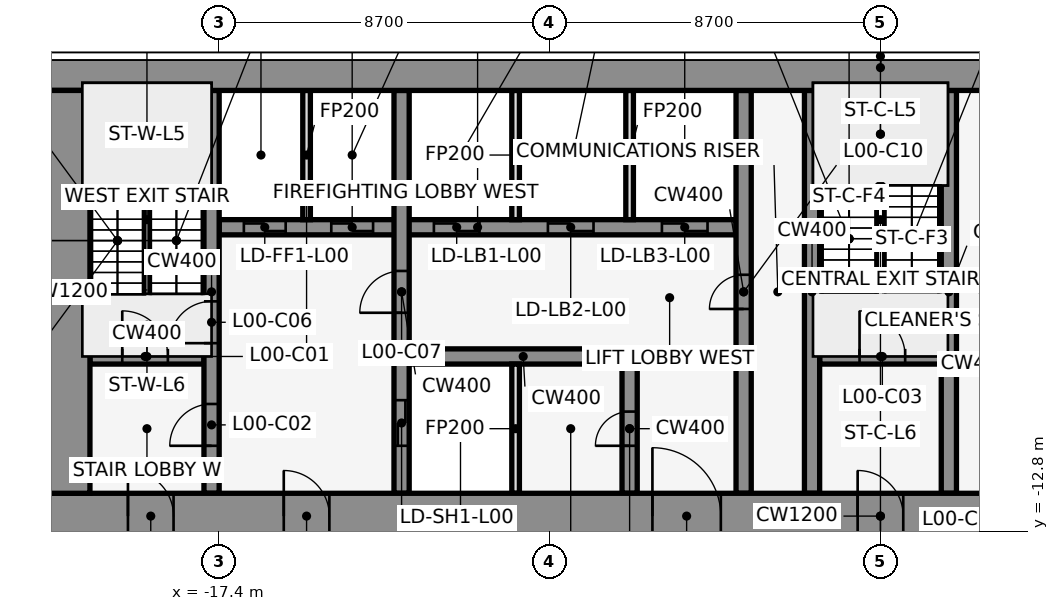
"""IFC4 building model, lengths in metres.
Left out: names, types, materials, properties, quantities, classifications, styles, units other than length and angle.
Written with IfcOpenShell. Run it as: python <this file> out.ifc"""

import sys

from ifc_helpers import new_model, si_unit, direction, frame, frame_2d, origin, place, context, subcontext, project, spatial, rectangle, extrude, element, fill, save


model = new_model("IFC4")
c1 = context("Model", 3, precision=1e-05, world=origin(), true_north=direction((0.0, 1.0)))
c2 = subcontext(c1, "Body", "Model", "MODEL_VIEW")
j1 = project(units=[si_unit("LENGTHUNIT", "METRE"), si_unit("PLANEANGLEUNIT", "RADIAN")], contexts=[c1])
p1 = place(None, origin())
s1 = spatial("IfcSite", under=j1, at=p1, CompositionType="ELEMENT")
p2 = place(p1, origin())
s2 = spatial("IfcBuilding", under=s1, at=p2, CompositionType="ELEMENT")
p3 = place(p2, origin())
s3 = spatial("IfcBuildingStorey", under=s2, at=p3, CompositionType="ELEMENT", Elevation=0.0)
p4 = place(p3, frame((-20.8, -8.2, 0.0), z_axis=(0.0, 0.0, 1.0), x_axis=(1.0, 0.0, 0.0)))
e1 = element("IfcWall", 1, at=p4, inside=s3, PredefinedType="SHEAR", context=c2, shape_type="SweptSolid", body=[
    extrude(rectangle(XDim=3.0, YDim=0.4, at=frame_2d((1.5, 0.0))), origin(), (0.0, 0.0, 1.0), 8.0),
])
p5 = place(p4, frame((0.85, 0.0, 0.0)))
e2 = element("IfcOpeningElement", 2, at=p5, cuts=e1, PredefinedType="OPENING", context=c2, shape_type="SweptSolid", body=[
    extrude(rectangle(XDim=1.2, YDim=2.1, at=frame_2d((0.6, 1.05))), frame((0.0, 0.212, 0.0), z_axis=(0.0, -1.0, 0.0), x_axis=(1.0, 0.0, 0.0)), (0.0, 0.0, 1.0), 0.424),
])
p6 = place(p3, frame((-12.4, -8.2, 0.0), z_axis=(0.0, 0.0, 1.0), x_axis=(1.0, 0.0, 0.0)))
e3 = element("IfcWall", 3, at=p6, inside=s3, PredefinedType="SHEAR", context=c2, shape_type="SweptSolid", body=[
    extrude(rectangle(XDim=6.0, YDim=0.4, at=frame_2d((3.0, 0.0))), origin(), (0.0, 0.0, 1.0), 8.0),
])
p7 = place(p3, frame((-1.6, -8.2, 0.0), z_axis=(0.0, 0.0, 1.0), x_axis=(1.0, 0.0, 0.0)))
e4 = element("IfcWall", 4, at=p7, inside=s3, PredefinedType="SHEAR", context=c2, shape_type="SweptSolid", body=[
    extrude(rectangle(XDim=3.2, YDim=0.4, at=frame_2d((1.6, 0.0))), origin(), (0.0, 0.0, 1.0), 8.0),
])
p8 = place(p7, frame((1.05, 0.0, 0.0)))
e5 = element("IfcOpeningElement", 5, at=p8, cuts=e4, PredefinedType="OPENING", context=c2, shape_type="SweptSolid", body=[
    extrude(rectangle(XDim=1.2, YDim=2.1, at=frame_2d((0.6, 1.05))), frame((0.0, 0.212, 0.0), z_axis=(0.0, -1.0, 0.0), x_axis=(1.0, 0.0, 0.0)), (0.0, 0.0, 1.0), 0.424),
])
p9 = place(p3, frame((-17.4, -4.8, 0.0), z_axis=(0.0, 0.0, 1.0), x_axis=(1.0, 0.0, 0.0)))
e6 = element("IfcWall", 6, at=p9, inside=s3, PredefinedType="SHEAR", context=c2, shape_type="SweptSolid", body=[
    extrude(rectangle(XDim=13.6, YDim=0.4, at=frame_2d((6.8, 0.0))), origin(), (0.0, 0.0, 1.0), 8.0),
])
p10 = place(p9, frame((0.65, 0.0, 0.0)))
e7 = element("IfcOpeningElement", 7, at=p10, cuts=e6, PredefinedType="OPENING", context=c2, shape_type="SweptSolid", body=[
    extrude(rectangle(XDim=1.1, YDim=2.1, at=frame_2d((0.55, 1.05))), frame((0.0, 0.212, 0.0), z_axis=(0.0, -1.0, 0.0), x_axis=(1.0, 0.0, 0.0)), (0.0, 0.0, 1.0), 0.424),
])
p11 = place(p9, frame((2.95, 0.0, 0.0)))
e8 = element("IfcOpeningElement", 8, at=p11, cuts=e6, PredefinedType="OPENING", context=c2, shape_type="SweptSolid", body=[
    extrude(rectangle(XDim=1.1, YDim=2.1, at=frame_2d((0.55, 1.05))), frame((0.0, 0.212, 0.0), z_axis=(0.0, -1.0, 0.0), x_axis=(1.0, 0.0, 0.0)), (0.0, 0.0, 1.0), 0.424),
])
p12 = place(p9, frame((5.65, 0.0, 0.0)))
e9 = element("IfcOpeningElement", 9, at=p12, cuts=e6, PredefinedType="OPENING", context=c2, shape_type="SweptSolid", body=[
    extrude(rectangle(XDim=1.2, YDim=2.1, at=frame_2d((0.6, 1.05))), frame((0.0, 0.212, 0.0), z_axis=(0.0, -1.0, 0.0), x_axis=(1.0, 0.0, 0.0)), (0.0, 0.0, 1.0), 0.424),
])
p13 = place(p9, frame((8.65, 0.0, 0.0)))
e10 = element("IfcOpeningElement", 10, at=p13, cuts=e6, PredefinedType="OPENING", context=c2, shape_type="SweptSolid", body=[
    extrude(rectangle(XDim=1.2, YDim=2.1, at=frame_2d((0.6, 1.05))), frame((0.0, 0.212, 0.0), z_axis=(0.0, -1.0, 0.0), x_axis=(1.0, 0.0, 0.0)), (0.0, 0.0, 1.0), 0.424),
])
p14 = place(p9, frame((11.65, 0.0, 0.0)))
e11 = element("IfcOpeningElement", 11, at=p14, cuts=e6, PredefinedType="OPENING", context=c2, shape_type="SweptSolid", body=[
    extrude(rectangle(XDim=1.2, YDim=2.1, at=frame_2d((0.6, 1.05))), frame((0.0, 0.212, 0.0), z_axis=(0.0, -1.0, 0.0), x_axis=(1.0, 0.0, 0.0)), (0.0, 0.0, 1.0), 0.424),
])
p15 = place(p3, frame((-17.6, -11.8, 0.0), z_axis=(0.0, 0.0, 1.0), x_axis=(0.0, 1.0, 0.0)))
e12 = element("IfcWall", 12, at=p15, inside=s3, PredefinedType="SHEAR", context=c2, shape_type="SweptSolid", body=[
    extrude(rectangle(XDim=10.6, YDim=0.4, at=frame_2d((5.3, 0.0))), origin(), (0.0, 0.0, 1.0), 8.0),
])
p16 = place(p15, frame((1.25, 0.0, 0.0)))
e13 = element("IfcOpeningElement", 13, at=p16, cuts=e12, PredefinedType="OPENING", context=c2, shape_type="SweptSolid", body=[
    extrude(rectangle(XDim=1.1, YDim=2.1, at=frame_2d((0.55, 1.05))), frame((0.0, 0.212, 0.0), z_axis=(0.0, -1.0, 0.0), x_axis=(1.0, 0.0, 0.0)), (0.0, 0.0, 1.0), 0.424),
])
p17 = place(p15, frame((3.95, 0.0, 0.0)))
e14 = element("IfcOpeningElement", 14, at=p17, cuts=e12, PredefinedType="OPENING", context=c2, shape_type="SweptSolid", body=[
    extrude(rectangle(XDim=1.1, YDim=2.1, at=frame_2d((0.55, 1.05))), frame((0.0, 0.212, 0.0), z_axis=(0.0, -1.0, 0.0), x_axis=(1.0, 0.0, 0.0)), (0.0, 0.0, 1.0), 0.424),
])
p18 = place(p3, frame((-15.1, -4.6, 0.0), z_axis=(0.0, 0.0, 1.0), x_axis=(0.0, 1.0, 0.0)))
e15 = element("IfcWall", 15, at=p18, inside=s3, PredefinedType="PARTITIONING", context=c2, shape_type="SweptSolid", body=[
    extrude(rectangle(XDim=3.4, YDim=0.2, at=frame_2d((1.7, 0.0))), origin(), (0.0, 0.0, 1.0), 7.7),
])
p19 = place(p3, frame((-12.6, -11.8, 0.0), z_axis=(0.0, 0.0, 1.0), x_axis=(0.0, 1.0, 0.0)))
e16 = element("IfcWall", 16, at=p19, inside=s3, PredefinedType="SHEAR", context=c2, shape_type="SweptSolid", body=[
    extrude(rectangle(XDim=10.6, YDim=0.4, at=frame_2d((5.3, 0.0))), origin(), (0.0, 0.0, 1.0), 8.0),
])
p20 = place(p19, frame((1.25, 0.0, 0.0)))
e17 = element("IfcOpeningElement", 17, at=p20, cuts=e16, PredefinedType="OPENING", context=c2, shape_type="SweptSolid", body=[
    extrude(rectangle(XDim=1.2, YDim=2.1, at=frame_2d((0.6, 1.05))), frame((0.0, 0.212, 0.0), z_axis=(0.0, -1.0, 0.0), x_axis=(1.0, 0.0, 0.0)), (0.0, 0.0, 1.0), 0.424),
])
p21 = place(p19, frame((4.75, 0.0, 0.0)))
e18 = element("IfcOpeningElement", 18, at=p21, cuts=e16, PredefinedType="OPENING", context=c2, shape_type="SweptSolid", body=[
    extrude(rectangle(XDim=1.1, YDim=2.1, at=frame_2d((0.55, 1.05))), frame((0.0, 0.212, 0.0), z_axis=(0.0, -1.0, 0.0), x_axis=(1.0, 0.0, 0.0)), (0.0, 0.0, 1.0), 0.424),
])
for number, where, z_axis, x_axis in (
    (19, (-9.6, -11.8, 0.0), (0.0, 0.0, 1.0), (0.0, 1.0, 0.0)),
    (20, (-9.6, -4.6, 0.0), (0.0, 0.0, 1.0), (0.0, 1.0, 0.0)),
):
    element("IfcWall", number, at=place(p3, frame(where, z_axis=z_axis, x_axis=x_axis)), inside=s3, PredefinedType="PARTITIONING", context=c2, shape_type="SweptSolid", body=[
        extrude(rectangle(XDim=3.4, YDim=0.2, at=frame_2d((1.7, 0.0))), origin(), (0.0, 0.0, 1.0), 7.7),
    ])
p22 = place(p3, frame((-6.6, -11.8, 0.0), z_axis=(0.0, 0.0, 1.0), x_axis=(0.0, 1.0, 0.0)))
e21 = element("IfcWall", 21, at=p22, inside=s3, PredefinedType="SHEAR", context=c2, shape_type="SweptSolid", body=[
    extrude(rectangle(XDim=3.4, YDim=0.4, at=frame_2d((1.7, 0.0))), origin(), (0.0, 0.0, 1.0), 8.0),
])
p23 = place(p22, frame((1.25, 0.0, 0.0)))
e22 = element("IfcOpeningElement", 22, at=p23, cuts=e21, PredefinedType="OPENING", context=c2, shape_type="SweptSolid", body=[
    extrude(rectangle(XDim=0.9, YDim=2.1, at=frame_2d((0.45, 1.05))), frame((0.0, 0.212, 0.0), z_axis=(0.0, -1.0, 0.0), x_axis=(1.0, 0.0, 0.0)), (0.0, 0.0, 1.0), 0.424),
])
p24 = place(p3, frame((-6.6, -4.6, 0.0), z_axis=(0.0, 0.0, 1.0), x_axis=(0.0, 1.0, 0.0)))
e23 = element("IfcWall", 23, at=p24, inside=s3, PredefinedType="PARTITIONING", context=c2, shape_type="SweptSolid", body=[
    extrude(rectangle(XDim=3.4, YDim=0.2, at=frame_2d((1.7, 0.0))), origin(), (0.0, 0.0, 1.0), 7.7),
])
p25 = place(p3, frame((-3.6, -11.8, 0.0), z_axis=(0.0, 0.0, 1.0), x_axis=(0.0, 1.0, 0.0)))
e24 = element("IfcWall", 24, at=p25, inside=s3, PredefinedType="SHEAR", context=c2, shape_type="SweptSolid", body=[
    extrude(rectangle(XDim=10.6, YDim=0.4, at=frame_2d((5.3, 0.0))), origin(), (0.0, 0.0, 1.0), 8.0),
])
p26 = place(p25, frame((4.85, 0.0, 0.0)))
e25 = element("IfcOpeningElement", 25, at=p26, cuts=e24, PredefinedType="OPENING", context=c2, shape_type="SweptSolid", body=[
    extrude(rectangle(XDim=0.9, YDim=2.1, at=frame_2d((0.45, 1.05))), frame((0.0, 0.212, 0.0), z_axis=(0.0, -1.0, 0.0), x_axis=(1.0, 0.0, 0.0)), (0.0, 0.0, 1.0), 0.424),
])
for number, where, z_axis, x_axis in (
    (26, (-1.8, -11.8, 0.0), (0.0, 0.0, 1.0), (0.0, 1.0, 0.0)),
    (27, (1.8, -11.8, 0.0), (0.0, 0.0, 1.0), (0.0, 1.0, 0.0)),
):
    element("IfcWall", number, at=place(p3, frame(where, z_axis=z_axis, x_axis=x_axis)), inside=s3, PredefinedType="SHEAR", context=c2, shape_type="SweptSolid", body=[
        extrude(rectangle(XDim=10.6, YDim=0.4, at=frame_2d((5.3, 0.0))), origin(), (0.0, 0.0, 1.0), 8.0),
    ])
p27 = place(p3, frame((-22.0, -0.6, 0.0), z_axis=(0.0, 0.0, 1.0), x_axis=(1.0, 0.0, 0.0)))
e28 = element("IfcWall", 28, at=p27, inside=s3, PredefinedType="SHEAR", context=c2, shape_type="SweptSolid", body=[
    extrude(rectangle(XDim=44.0, YDim=1.2, at=frame_2d((22.0, 0.0))), origin(), (0.0, 0.0, 1.0), 8.0),
])
p28 = place(p3, frame((-22.0, -12.4, 0.0), z_axis=(0.0, 0.0, 1.0), x_axis=(1.0, 0.0, 0.0)))
e29 = element("IfcWall", 29, at=p28, inside=s3, PredefinedType="SHEAR", context=c2, shape_type="SweptSolid", body=[
    extrude(rectangle(XDim=44.0, YDim=1.2, at=frame_2d((22.0, 0.0))), origin(), (0.0, 0.0, 1.0), 8.0),
])
p29 = place(p28, frame((2.2, 0.0, 0.0)))
e30 = element("IfcOpeningElement", 30, at=p29, cuts=e29, PredefinedType="OPENING", context=c2, shape_type="SweptSolid", body=[
    extrude(rectangle(XDim=1.2, YDim=2.1, at=frame_2d((0.6, 1.05))), frame((0.0, 0.612, 0.0), z_axis=(0.0, -1.0, 0.0), x_axis=(1.0, 0.0, 0.0)), (0.0, 0.0, 1.0), 1.224),
])
p30 = place(p28, frame((21.4, 0.0, 0.0)))
e31 = element("IfcOpeningElement", 31, at=p30, cuts=e29, PredefinedType="OPENING", context=c2, shape_type="SweptSolid", body=[
    extrude(rectangle(XDim=1.2, YDim=2.1, at=frame_2d((0.6, 1.05))), frame((0.0, 0.612, 0.0), z_axis=(0.0, -1.0, 0.0), x_axis=(1.0, 0.0, 0.0)), (0.0, 0.0, 1.0), 1.224),
])
p31 = place(p28, frame((40.6, 0.0, 0.0)))
e32 = element("IfcOpeningElement", 32, at=p31, cuts=e29, PredefinedType="OPENING", context=c2, shape_type="SweptSolid", body=[
    extrude(rectangle(XDim=1.2, YDim=2.1, at=frame_2d((0.6, 1.05))), frame((0.0, 0.612, 0.0), z_axis=(0.0, -1.0, 0.0), x_axis=(1.0, 0.0, 0.0)), (0.0, 0.0, 1.0), 1.224),
])
p32 = place(p28, frame((16.0, 0.0, 0.0)))
e33 = element("IfcOpeningElement", 33, at=p32, cuts=e29, PredefinedType="OPENING", context=c2, shape_type="SweptSolid", body=[
    extrude(rectangle(XDim=1.8, YDim=2.1, at=frame_2d((0.9, 1.05))), frame((0.0, 0.612, 0.0), z_axis=(0.0, -1.0, 0.0), x_axis=(1.0, 0.0, 0.0)), (0.0, 0.0, 1.0), 1.224),
])
p33 = place(p28, frame((6.3, 0.0, 0.0)))
e34 = element("IfcOpeningElement", 34, at=p33, cuts=e29, PredefinedType="OPENING", context=c2, shape_type="SweptSolid", body=[
    extrude(rectangle(XDim=1.2, YDim=2.1, at=frame_2d((0.6, 1.05))), frame((0.0, 0.612, 0.0), z_axis=(0.0, -1.0, 0.0), x_axis=(1.0, 0.0, 0.0)), (0.0, 0.0, 1.0), 1.224),
])
p34 = place(p28, frame((26.2, 0.0, 0.0)))
e35 = element("IfcOpeningElement", 35, at=p34, cuts=e29, PredefinedType="OPENING", context=c2, shape_type="SweptSolid", body=[
    extrude(rectangle(XDim=1.8, YDim=2.1, at=frame_2d((0.9, 1.05))), frame((0.0, 0.612, 0.0), z_axis=(0.0, -1.0, 0.0), x_axis=(1.0, 0.0, 0.0)), (0.0, 0.0, 1.0), 1.224),
])
p35 = place(p28, frame((36.5, 0.0, 0.0)))
e36 = element("IfcOpeningElement", 36, at=p35, cuts=e29, PredefinedType="OPENING", context=c2, shape_type="SweptSolid", body=[
    extrude(rectangle(XDim=1.2, YDim=2.1, at=frame_2d((0.6, 1.05))), frame((0.0, 0.612, 0.0), z_axis=(0.0, -1.0, 0.0), x_axis=(1.0, 0.0, 0.0)), (0.0, 0.0, 1.0), 1.224),
])
p36 = place(p3, frame((-21.4, -11.8, 0.0), z_axis=(0.0, 0.0, 1.0), x_axis=(0.0, 1.0, 0.0)))
e37 = element("IfcWall", 37, at=p36, inside=s3, PredefinedType="SHEAR", context=c2, shape_type="SweptSolid", body=[
    extrude(rectangle(XDim=10.6, YDim=1.2, at=frame_2d((5.3, 0.0))), origin(), (0.0, 0.0, 1.0), 8.0),
])
p37 = place(p5, origin())
e38 = element("IfcDoor", 38, at=p37, inside=s3, OperationType="SINGLE_SWING_LEFT", PredefinedType="DOOR", context=c2, shape_type="SweptSolid", body=[
    extrude(rectangle(XDim=1.2, YDim=2.1, at=frame_2d((0.6, 1.05))), frame((0.0, 0.025, 0.0), z_axis=(0.0, -1.0, 0.0), x_axis=(1.0, 0.0, 0.0)), (0.0, 0.0, 1.0), 0.05),
])
fill(e2, e38)
p38 = place(p16, frame((1.1, 0.0, 0.0), z_axis=(0.0, 0.0, 1.0), x_axis=(-1.0, 0.0, 0.0)))
e39 = element("IfcDoor", 39, at=p38, inside=s3, OperationType="SINGLE_SWING_LEFT", PredefinedType="DOOR", context=c2, shape_type="SweptSolid", body=[
    extrude(rectangle(XDim=1.1, YDim=2.1, at=frame_2d((0.55, 1.05))), frame((0.0, 0.025, 0.0), z_axis=(0.0, -1.0, 0.0), x_axis=(1.0, 0.0, 0.0)), (0.0, 0.0, 1.0), 0.05),
])
fill(e13, e39)
p39 = place(p8, origin())
e40 = element("IfcDoor", 40, at=p39, inside=s3, OperationType="SINGLE_SWING_LEFT", PredefinedType="DOOR", context=c2, shape_type="SweptSolid", body=[
    extrude(rectangle(XDim=1.2, YDim=2.1, at=frame_2d((0.6, 1.05))), frame((0.0, 0.025, 0.0), z_axis=(0.0, -1.0, 0.0), x_axis=(1.0, 0.0, 0.0)), (0.0, 0.0, 1.0), 0.05),
])
fill(e5, e40)
p40 = place(p10, origin())
e41 = element("IfcDoor", 41, at=p40, inside=s3, OperationType="DOUBLE_DOOR_SLIDING", PredefinedType="DOOR", context=c2, shape_type="SweptSolid", body=[
    extrude(rectangle(XDim=1.1, YDim=2.1, at=frame_2d((0.55, 1.05))), frame((0.0, 0.025, 0.0), z_axis=(0.0, -1.0, 0.0), x_axis=(1.0, 0.0, 0.0)), (0.0, 0.0, 1.0), 0.05),
])
fill(e7, e41)
p41 = place(p11, origin())
e42 = element("IfcDoor", 42, at=p41, inside=s3, OperationType="DOUBLE_DOOR_SLIDING", PredefinedType="DOOR", context=c2, shape_type="SweptSolid", body=[
    extrude(rectangle(XDim=1.1, YDim=2.1, at=frame_2d((0.55, 1.05))), frame((0.0, 0.025, 0.0), z_axis=(0.0, -1.0, 0.0), x_axis=(1.0, 0.0, 0.0)), (0.0, 0.0, 1.0), 0.05),
])
fill(e8, e42)
p42 = place(p12, origin())
e43 = element("IfcDoor", 43, at=p42, inside=s3, OperationType="DOUBLE_DOOR_SLIDING", PredefinedType="DOOR", context=c2, shape_type="SweptSolid", body=[
    extrude(rectangle(XDim=1.2, YDim=2.1, at=frame_2d((0.6, 1.05))), frame((0.0, 0.025, 0.0), z_axis=(0.0, -1.0, 0.0), x_axis=(1.0, 0.0, 0.0)), (0.0, 0.0, 1.0), 0.05),
])
fill(e9, e43)
p43 = place(p13, origin())
e44 = element("IfcDoor", 44, at=p43, inside=s3, OperationType="DOUBLE_DOOR_SLIDING", PredefinedType="DOOR", context=c2, shape_type="SweptSolid", body=[
    extrude(rectangle(XDim=1.2, YDim=2.1, at=frame_2d((0.6, 1.05))), frame((0.0, 0.025, 0.0), z_axis=(0.0, -1.0, 0.0), x_axis=(1.0, 0.0, 0.0)), (0.0, 0.0, 1.0), 0.05),
])
fill(e10, e44)
p44 = place(p14, origin())
e45 = element("IfcDoor", 45, at=p44, inside=s3, OperationType="DOUBLE_DOOR_SLIDING", PredefinedType="DOOR", context=c2, shape_type="SweptSolid", body=[
    extrude(rectangle(XDim=1.2, YDim=2.1, at=frame_2d((0.6, 1.05))), frame((0.0, 0.025, 0.0), z_axis=(0.0, -1.0, 0.0), x_axis=(1.0, 0.0, 0.0)), (0.0, 0.0, 1.0), 0.05),
])
fill(e11, e45)
p45 = place(p20, origin())
e46 = element("IfcDoor", 46, at=p45, inside=s3, OperationType="DOUBLE_DOOR_SLIDING", PredefinedType="DOOR", context=c2, shape_type="SweptSolid", body=[
    extrude(rectangle(XDim=1.2, YDim=2.1, at=frame_2d((0.6, 1.05))), frame((0.0, 0.025, 0.0), z_axis=(0.0, -1.0, 0.0), x_axis=(1.0, 0.0, 0.0)), (0.0, 0.0, 1.0), 0.05),
])
fill(e17, e46)
p46 = place(p17, frame((1.1, 0.0, 0.0), z_axis=(0.0, 0.0, 1.0), x_axis=(-1.0, 0.0, 0.0)))
e47 = element("IfcDoor", 47, at=p46, inside=s3, OperationType="SINGLE_SWING_LEFT", PredefinedType="DOOR", context=c2, shape_type="SweptSolid", body=[
    extrude(rectangle(XDim=1.1, YDim=2.1, at=frame_2d((0.55, 1.05))), frame((0.0, 0.025, 0.0), z_axis=(0.0, -1.0, 0.0), x_axis=(1.0, 0.0, 0.0)), (0.0, 0.0, 1.0), 0.05),
])
fill(e14, e47)
p47 = place(p21, origin())
e48 = element("IfcDoor", 48, at=p47, inside=s3, OperationType="SINGLE_SWING_LEFT", PredefinedType="DOOR", context=c2, shape_type="SweptSolid", body=[
    extrude(rectangle(XDim=1.1, YDim=2.1, at=frame_2d((0.55, 1.05))), frame((0.0, 0.025, 0.0), z_axis=(0.0, -1.0, 0.0), x_axis=(1.0, 0.0, 0.0)), (0.0, 0.0, 1.0), 0.05),
])
fill(e18, e48)
p48 = place(p26, frame((0.9, 0.0, 0.0), z_axis=(0.0, 0.0, 1.0), x_axis=(-1.0, 0.0, 0.0)))
e49 = element("IfcDoor", 49, at=p48, inside=s3, OperationType="SINGLE_SWING_LEFT", PredefinedType="DOOR", context=c2, shape_type="SweptSolid", body=[
    extrude(rectangle(XDim=0.9, YDim=2.1, at=frame_2d((0.45, 1.05))), frame((0.0, 0.025, 0.0), z_axis=(0.0, -1.0, 0.0), x_axis=(1.0, 0.0, 0.0)), (0.0, 0.0, 1.0), 0.05),
])
fill(e25, e49)
p49 = place(p23, origin())
e50 = element("IfcDoor", 50, at=p49, inside=s3, OperationType="SINGLE_SWING_LEFT", PredefinedType="DOOR", context=c2, shape_type="SweptSolid", body=[
    extrude(rectangle(XDim=0.9, YDim=2.1, at=frame_2d((0.45, 1.05))), frame((0.0, 0.025, 0.0), z_axis=(0.0, -1.0, 0.0), x_axis=(1.0, 0.0, 0.0)), (0.0, 0.0, 1.0), 0.05),
])
fill(e22, e50)
p50 = place(p29, frame((1.2, 0.0, 0.0), z_axis=(0.0, 0.0, 1.0), x_axis=(-1.0, 0.0, 0.0)))
e51 = element("IfcDoor", 51, at=p50, inside=s3, OperationType="SINGLE_SWING_RIGHT", PredefinedType="DOOR", context=c2, shape_type="SweptSolid", body=[
    extrude(rectangle(XDim=1.2, YDim=2.1, at=frame_2d((0.6, 1.05))), frame((0.0, 0.025, 0.0), z_axis=(0.0, -1.0, 0.0), x_axis=(1.0, 0.0, 0.0)), (0.0, 0.0, 1.0), 0.05),
])
fill(e30, e51)
p51 = place(p30, frame((1.2, 0.0, 0.0), z_axis=(0.0, 0.0, 1.0), x_axis=(-1.0, 0.0, 0.0)))
e52 = element("IfcDoor", 52, at=p51, inside=s3, OperationType="SINGLE_SWING_RIGHT", PredefinedType="DOOR", context=c2, shape_type="SweptSolid", body=[
    extrude(rectangle(XDim=1.2, YDim=2.1, at=frame_2d((0.6, 1.05))), frame((0.0, 0.025, 0.0), z_axis=(0.0, -1.0, 0.0), x_axis=(1.0, 0.0, 0.0)), (0.0, 0.0, 1.0), 0.05),
])
fill(e31, e52)
p52 = place(p32, origin())
e53 = element("IfcDoor", 53, at=p52, inside=s3, OperationType="SINGLE_SWING_LEFT", PredefinedType="DOOR", context=c2, shape_type="SweptSolid", body=[
    extrude(rectangle(XDim=1.8, YDim=2.1, at=frame_2d((0.9, 1.05))), frame((0.0, 0.025, 0.0), z_axis=(0.0, -1.0, 0.0), x_axis=(1.0, 0.0, 0.0)), (0.0, 0.0, 1.0), 0.05),
])
fill(e33, e53)
p53 = place(p33, frame((1.2, 0.0, 0.0), z_axis=(0.0, 0.0, 1.0), x_axis=(-1.0, 0.0, 0.0)))
e54 = element("IfcDoor", 54, at=p53, inside=s3, OperationType="SINGLE_SWING_RIGHT", PredefinedType="DOOR", context=c2, shape_type="SweptSolid", body=[
    extrude(rectangle(XDim=1.2, YDim=2.1, at=frame_2d((0.6, 1.05))), frame((0.0, 0.025, 0.0), z_axis=(0.0, -1.0, 0.0), x_axis=(1.0, 0.0, 0.0)), (0.0, 0.0, 1.0), 0.05),
])
fill(e34, e54)
save(model, sys.argv[1])
